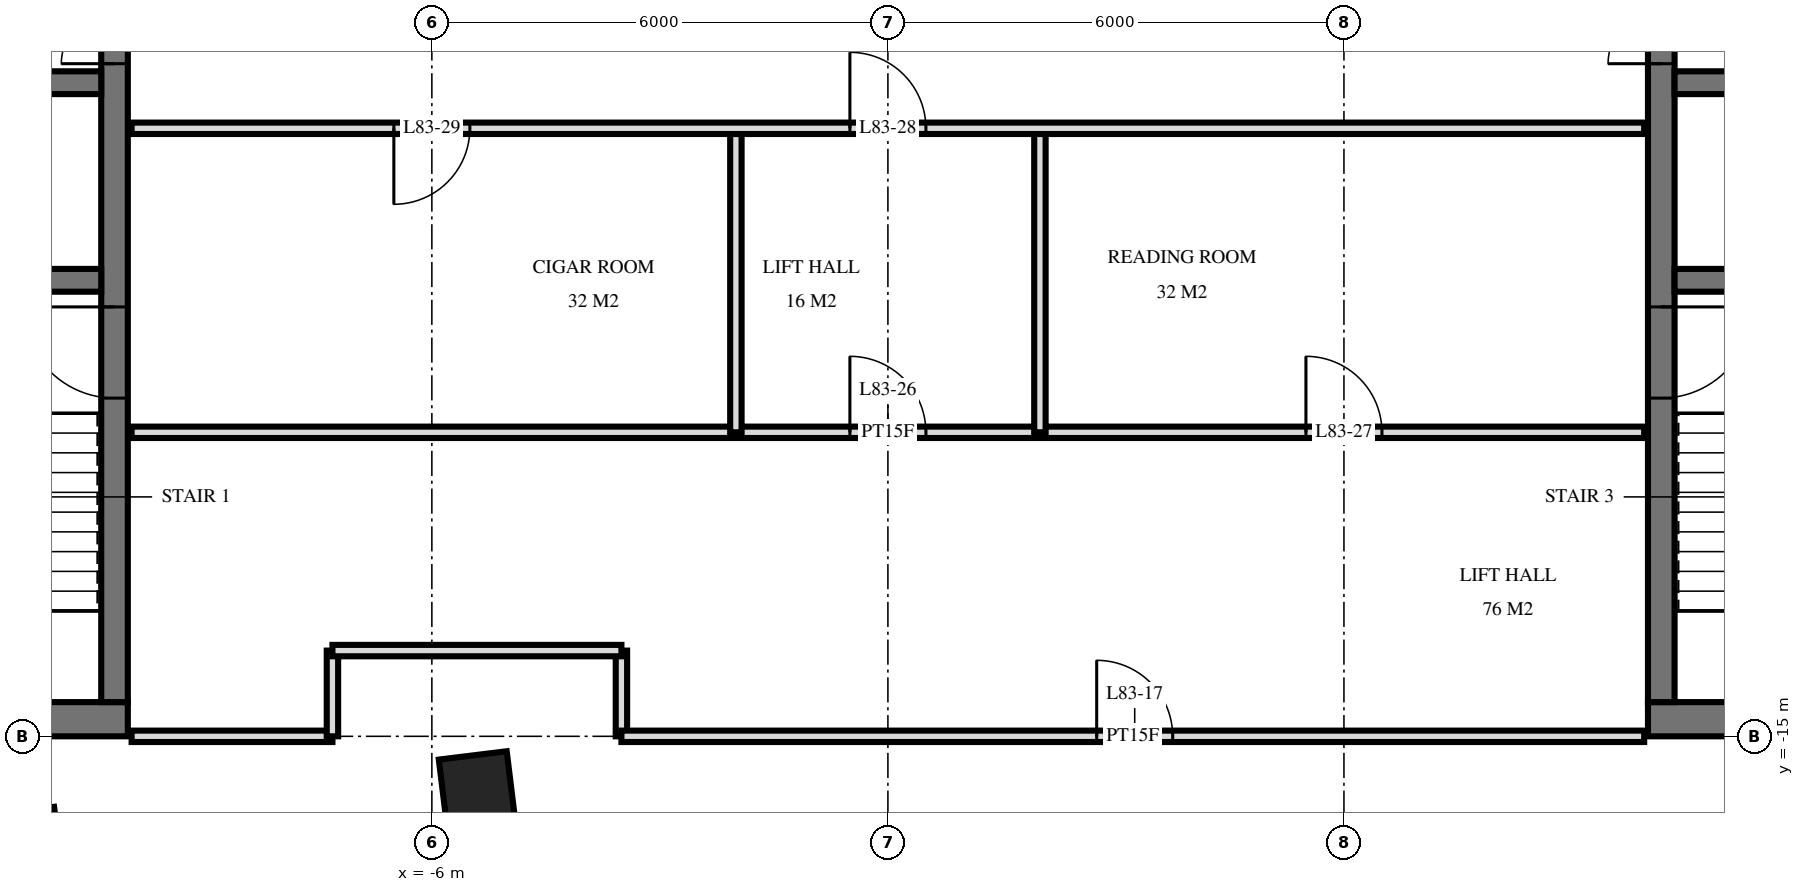
"""IFC4 building model, lengths in metres.
Left out: names, types, materials, properties, quantities, classifications, styles, units other than length and angle.
Written with IfcOpenShell. Run it as: python <this file> out.ifc"""

import sys

from ifc_helpers import new_model, si_unit, direction, frame, frame_2d, origin, origin_2d, place, context, subcontext, project, spatial, rectangle, extrude, element, fill, save


model = new_model("IFC4")
c1 = context("Model", 3, precision=1e-05, world=origin(), true_north=direction((0.0, 1.0)))
c2 = subcontext(c1, "Body", "Model", "MODEL_VIEW")
j1 = project(units=[si_unit("LENGTHUNIT", "METRE"), si_unit("PLANEANGLEUNIT", "RADIAN")], contexts=[c1])
p1 = place(None, origin())
s1 = spatial("IfcSite", under=j1, at=p1, CompositionType="ELEMENT")
p2 = place(p1, origin())
s2 = spatial("IfcBuilding", under=s1, at=p2, CompositionType="ELEMENT")
p3 = place(p2, frame((0.0, 0.0, 314.6)))
s3 = spatial("IfcBuildingStorey", under=s2, at=p3, CompositionType="ELEMENT", Elevation=314.6)
for number, where, z_axis, x_axis in (
    (1, (-11.362, -16.429, -0.28), (0.0, 0.0, 1.0), (0.993, 0.122, 0.0)),
    (2, (-5.407, -15.698, -0.28), (0.0, 0.0, 1.0), (0.993, 0.122, 0.0)),
):
    element("IfcColumn", number, at=place(p3, frame(where, z_axis=z_axis, x_axis=x_axis)), inside=s3, PredefinedType="COLUMN", context=c2, shape_type="SweptSolid", body=[
        extrude(rectangle(XDim=0.9, YDim=0.9, at=origin_2d()), origin(), (0.0, 0.0, 1.0), 4.28),
    ])
p4 = place(p3, frame((-19.5, -14.775, 0.0), z_axis=(0.0, 0.0, 1.0), x_axis=(1.0, 0.0, 0.0)))
e3 = element("IfcWall", 3, at=p4, inside=s3, PredefinedType="SHEAR", context=c2, shape_type="SweptSolid", body=[
    extrude(rectangle(XDim=9.5, YDim=0.45, at=frame_2d((4.75, 0.0))), origin(), (0.0, 0.0, 1.0), 4.0),
])
p5 = place(p4, frame((1.2, 0.0, 0.0)))
e4 = element("IfcOpeningElement", 4, at=p5, cuts=e3, PredefinedType="OPENING", context=c2, shape_type="SweptSolid", body=[
    extrude(rectangle(XDim=1.2, YDim=2.1, at=frame_2d((0.6, 1.05))), frame((0.0, 0.235, 0.0), z_axis=(0.0, -1.0, 0.0), x_axis=(1.0, 0.0, 0.0)), (0.0, 0.0, 1.0), 0.47),
])
p6 = place(p4, frame((4.25, 0.0, 0.0)))
e5 = element("IfcOpeningElement", 5, at=p6, cuts=e3, PredefinedType="OPENING", context=c2, shape_type="SweptSolid", body=[
    extrude(rectangle(XDim=1.1, YDim=2.1, at=frame_2d((0.55, 1.05))), frame((0.0, 0.235, 0.0), z_axis=(0.0, -1.0, 0.0), x_axis=(1.0, 0.0, 0.0)), (0.0, 0.0, 1.0), 0.47),
])
p7 = place(p3, frame((-10.175, -14.55, 0.0), z_axis=(0.0, 0.0, 1.0), x_axis=(0.0, 1.0, 0.0)))
e6 = element("IfcWall", 6, at=p7, inside=s3, PredefinedType="SHEAR", context=c2, shape_type="SweptSolid", body=[
    extrude(rectangle(XDim=14.1, YDim=0.35, at=frame_2d((7.05, 0.0))), origin(), (0.0, 0.0, 1.0), 4.0),
])
p8 = place(p7, frame((8.4, 0.0, 0.0)))
e7 = element("IfcOpeningElement", 7, at=p8, cuts=e6, PredefinedType="OPENING", context=c2, shape_type="SweptSolid", body=[
    extrude(rectangle(XDim=1.4, YDim=2.4, at=frame_2d((0.7, 1.2))), frame((0.0, 0.185, 0.0), z_axis=(0.0, -1.0, 0.0), x_axis=(1.0, 0.0, 0.0)), (0.0, 0.0, 1.0), 0.37),
])
p9 = place(p7, frame((10.0, 0.0, 0.0)))
e8 = element("IfcOpeningElement", 8, at=p9, cuts=e6, PredefinedType="OPENING", context=c2, shape_type="SweptSolid", body=[
    extrude(rectangle(XDim=1.4, YDim=2.4, at=frame_2d((0.7, 1.2))), frame((0.0, 0.185, 0.0), z_axis=(0.0, -1.0, 0.0), x_axis=(1.0, 0.0, 0.0)), (0.0, 0.0, 1.0), 0.37),
])
p10 = place(p7, frame((4.0, 0.0, 0.0)))
e9 = element("IfcOpeningElement", 9, at=p10, cuts=e6, PredefinedType="OPENING", context=c2, shape_type="SweptSolid", body=[
    extrude(rectangle(XDim=1.2, YDim=2.1, at=frame_2d((0.6, 1.05))), frame((0.0, 0.185, 0.0), z_axis=(0.0, -1.0, 0.0), x_axis=(1.0, 0.0, 0.0)), (0.0, 0.0, 1.0), 0.37),
])
p11 = place(p3, frame((-19.05, -6.4, 0.0), z_axis=(0.0, 0.0, 1.0), x_axis=(1.0, 0.0, 0.0)))
e10 = element("IfcWall", 10, at=p11, inside=s3, PredefinedType="SHEAR", context=c2, shape_type="SweptSolid", body=[
    extrude(rectangle(XDim=8.7, YDim=0.3, at=frame_2d((4.35, 0.0))), origin(), (0.0, 0.0, 1.0), 4.0),
])
p12 = place(p11, frame((0.8, 0.0, 0.0)))
e11 = element("IfcOpeningElement", 11, at=p12, cuts=e10, PredefinedType="OPENING", context=c2, shape_type="SweptSolid", body=[
    extrude(rectangle(XDim=1.1, YDim=2.1, at=frame_2d((0.55, 1.05))), frame((0.0, 0.16, 0.0), z_axis=(0.0, -1.0, 0.0), x_axis=(1.0, 0.0, 0.0)), (0.0, 0.0, 1.0), 0.32),
])
p13 = place(p3, frame((-19.05, -9.0, 0.0), z_axis=(0.0, 0.0, 1.0), x_axis=(1.0, 0.0, 0.0)))
e12 = element("IfcWall", 12, at=p13, inside=s3, PredefinedType="SHEAR", context=c2, shape_type="SweptSolid", body=[
    extrude(rectangle(XDim=8.7, YDim=0.3, at=frame_2d((4.35, 0.0))), origin(), (0.0, 0.0, 1.0), 4.0),
])
p14 = place(p13, frame((3.8, 0.0, 0.0)))
e13 = element("IfcOpeningElement", 13, at=p14, cuts=e12, PredefinedType="OPENING", context=c2, shape_type="SweptSolid", body=[
    extrude(rectangle(XDim=1.1, YDim=2.1, at=frame_2d((0.55, 1.05))), frame((0.0, 0.16, 0.0), z_axis=(0.0, -1.0, 0.0), x_axis=(1.0, 0.0, 0.0)), (0.0, 0.0, 1.0), 0.32),
])
p15 = place(p3, frame((10.0, -14.775, 0.0), z_axis=(0.0, 0.0, 1.0), x_axis=(1.0, 0.0, 0.0)))
e14 = element("IfcWall", 14, at=p15, inside=s3, PredefinedType="SHEAR", context=c2, shape_type="SweptSolid", body=[
    extrude(rectangle(XDim=9.5, YDim=0.45, at=frame_2d((4.75, 0.0))), origin(), (0.0, 0.0, 1.0), 4.0),
])
p16 = place(p15, frame((7.1, 0.0, 0.0)))
e15 = element("IfcOpeningElement", 15, at=p16, cuts=e14, PredefinedType="OPENING", context=c2, shape_type="SweptSolid", body=[
    extrude(rectangle(XDim=1.2, YDim=2.1, at=frame_2d((0.6, 1.05))), frame((0.0, 0.235, 0.0), z_axis=(0.0, -1.0, 0.0), x_axis=(1.0, 0.0, 0.0)), (0.0, 0.0, 1.0), 0.47),
])
p17 = place(p15, frame((4.15, 0.0, 0.0)))
e16 = element("IfcOpeningElement", 16, at=p17, cuts=e14, PredefinedType="OPENING", context=c2, shape_type="SweptSolid", body=[
    extrude(rectangle(XDim=1.1, YDim=2.1, at=frame_2d((0.55, 1.05))), frame((0.0, 0.235, 0.0), z_axis=(0.0, -1.0, 0.0), x_axis=(1.0, 0.0, 0.0)), (0.0, 0.0, 1.0), 0.47),
])
p18 = place(p3, frame((10.175, -14.55, 0.0), z_axis=(0.0, 0.0, 1.0), x_axis=(0.0, 1.0, 0.0)))
e17 = element("IfcWall", 17, at=p18, inside=s3, PredefinedType="SHEAR", context=c2, shape_type="SweptSolid", body=[
    extrude(rectangle(XDim=14.1, YDim=0.35, at=frame_2d((7.05, 0.0))), origin(), (0.0, 0.0, 1.0), 4.0),
])
p19 = place(p18, frame((8.4, 0.0, 0.0)))
e18 = element("IfcOpeningElement", 18, at=p19, cuts=e17, PredefinedType="OPENING", context=c2, shape_type="SweptSolid", body=[
    extrude(rectangle(XDim=1.4, YDim=2.4, at=frame_2d((0.7, 1.2))), frame((0.0, 0.185, 0.0), z_axis=(0.0, -1.0, 0.0), x_axis=(1.0, 0.0, 0.0)), (0.0, 0.0, 1.0), 0.37),
])
p20 = place(p18, frame((10.0, 0.0, 0.0)))
e19 = element("IfcOpeningElement", 19, at=p20, cuts=e17, PredefinedType="OPENING", context=c2, shape_type="SweptSolid", body=[
    extrude(rectangle(XDim=1.4, YDim=2.4, at=frame_2d((0.7, 1.2))), frame((0.0, 0.185, 0.0), z_axis=(0.0, -1.0, 0.0), x_axis=(1.0, 0.0, 0.0)), (0.0, 0.0, 1.0), 0.37),
])
p21 = place(p18, frame((4.0, 0.0, 0.0)))
e20 = element("IfcOpeningElement", 20, at=p21, cuts=e17, PredefinedType="OPENING", context=c2, shape_type="SweptSolid", body=[
    extrude(rectangle(XDim=1.2, YDim=2.1, at=frame_2d((0.6, 1.05))), frame((0.0, 0.185, 0.0), z_axis=(0.0, -1.0, 0.0), x_axis=(1.0, 0.0, 0.0)), (0.0, 0.0, 1.0), 0.37),
])
p22 = place(p3, frame((10.35, -6.4, 0.0), z_axis=(0.0, 0.0, 1.0), x_axis=(1.0, 0.0, 0.0)))
e21 = element("IfcWall", 21, at=p22, inside=s3, PredefinedType="SHEAR", context=c2, shape_type="SweptSolid", body=[
    extrude(rectangle(XDim=8.7, YDim=0.3, at=frame_2d((4.35, 0.0))), origin(), (0.0, 0.0, 1.0), 4.0),
])
p23 = place(p22, frame((6.8, 0.0, 0.0)))
e22 = element("IfcOpeningElement", 22, at=p23, cuts=e21, PredefinedType="OPENING", context=c2, shape_type="SweptSolid", body=[
    extrude(rectangle(XDim=1.1, YDim=2.1, at=frame_2d((0.55, 1.05))), frame((0.0, 0.16, 0.0), z_axis=(0.0, -1.0, 0.0), x_axis=(1.0, 0.0, 0.0)), (0.0, 0.0, 1.0), 0.32),
])
p24 = place(p3, frame((10.35, -9.0, 0.0), z_axis=(0.0, 0.0, 1.0), x_axis=(1.0, 0.0, 0.0)))
e23 = element("IfcWall", 23, at=p24, inside=s3, PredefinedType="SHEAR", context=c2, shape_type="SweptSolid", body=[
    extrude(rectangle(XDim=8.7, YDim=0.3, at=frame_2d((4.35, 0.0))), origin(), (0.0, 0.0, 1.0), 4.0),
])
p25 = place(p24, frame((3.8, 0.0, 0.0)))
e24 = element("IfcOpeningElement", 24, at=p25, cuts=e23, PredefinedType="OPENING", context=c2, shape_type="SweptSolid", body=[
    extrude(rectangle(XDim=1.1, YDim=2.1, at=frame_2d((0.55, 1.05))), frame((0.0, 0.16, 0.0), z_axis=(0.0, -1.0, 0.0), x_axis=(1.0, 0.0, 0.0)), (0.0, 0.0, 1.0), 0.32),
])
for number, where, z_axis, x_axis in (
    (25, (2.0, -11.0, 0.0), (0.0, 0.0, 1.0), (0.0, 1.0, 0.0)),
    (26, (-2.0, -11.0, 0.0), (0.0, 0.0, 1.0), (0.0, 1.0, 0.0)),
):
    element("IfcWall", number, at=place(p3, frame(where, z_axis=z_axis, x_axis=x_axis)), inside=s3, PredefinedType="PARTITIONING", context=c2, shape_type="SweptSolid", body=[
        extrude(rectangle(XDim=4.0, YDim=0.15, at=frame_2d((2.0, 0.0))), origin(), (0.0, 0.0, 1.0), 3.72),
    ])
for number, where, z_axis, x_axis in (
    (27, (-3.506, -15.0, 0.0), (0.0, 0.0, 1.0), (0.0, 1.0, 0.0)),
    (28, (-7.308, -15.0, 0.0), (0.0, 0.0, 1.0), (0.0, 1.0, 0.0)),
):
    element("IfcWall", number, at=place(p3, frame(where, z_axis=z_axis, x_axis=x_axis)), inside=s3, PredefinedType="PARTITIONING", context=c2, shape_type="SweptSolid", body=[
        extrude(rectangle(XDim=1.128, YDim=0.15, at=frame_2d((0.564, 0.0))), origin(), (0.0, 0.0, 1.0), 3.72),
    ])
p26 = place(p3, frame((-9.95, -15.0, 0.0), z_axis=(0.0, 0.0, 1.0), x_axis=(1.0, 0.0, 0.0)))
e29 = element("IfcWall", 29, at=p26, inside=s3, PredefinedType="PARTITIONING", context=c2, shape_type="SweptSolid", body=[
    extrude(rectangle(XDim=2.642, YDim=0.15, at=frame_2d((1.321, 0.0))), origin(), (0.0, 0.0, 1.0), 3.084),
])
p27 = place(p3, frame((-3.506, -15.0, 0.0), z_axis=(0.0, 0.0, 1.0), x_axis=(1.0, 0.0, 0.0)))
e30 = element("IfcWall", 30, at=p27, inside=s3, PredefinedType="PARTITIONING", context=c2, shape_type="SweptSolid", body=[
    extrude(rectangle(XDim=13.456, YDim=0.15, at=frame_2d((6.728, 0.0))), origin(), (0.0, 0.0, 1.0), 3.084),
])
p28 = place(p27, frame((6.253, 0.0, 0.0)))
e31 = element("IfcOpeningElement", 31, at=p28, cuts=e30, PredefinedType="OPENING", context=c2, shape_type="SweptSolid", body=[
    extrude(rectangle(XDim=1.0, YDim=2.1, at=frame_2d((0.5, 1.05))), frame((0.0, 0.085, 0.0), z_axis=(0.0, -1.0, 0.0), x_axis=(1.0, 0.0, 0.0)), (0.0, 0.0, 1.0), 0.17),
])
p29 = place(p3, frame((-7.308, -13.872, 0.0), z_axis=(0.0, 0.0, 1.0), x_axis=(1.0, 0.0, 0.0)))
e32 = element("IfcWall", 32, at=p29, inside=s3, PredefinedType="PARTITIONING", context=c2, shape_type="SweptSolid", body=[
    extrude(rectangle(XDim=3.802, YDim=0.15, at=frame_2d((1.901, 0.0))), origin(), (0.0, 0.0, 1.0), 3.72),
])
p30 = place(p3, frame((-9.95, -11.0, 0.0), z_axis=(0.0, 0.0, 1.0), x_axis=(1.0, 0.0, 0.0)))
e33 = element("IfcWall", 33, at=p30, inside=s3, PredefinedType="PARTITIONING", context=c2, shape_type="SweptSolid", body=[
    extrude(rectangle(XDim=19.9, YDim=0.15, at=frame_2d((9.95, 0.0))), origin(), (0.0, 0.0, 1.0), 3.72),
])
p31 = place(p30, frame((9.45, 0.0, 0.0)))
e34 = element("IfcOpeningElement", 34, at=p31, cuts=e33, PredefinedType="OPENING", context=c2, shape_type="SweptSolid", body=[
    extrude(rectangle(XDim=1.0, YDim=2.1, at=frame_2d((0.5, 1.05))), frame((0.0, 0.085, 0.0), z_axis=(0.0, -1.0, 0.0), x_axis=(1.0, 0.0, 0.0)), (0.0, 0.0, 1.0), 0.17),
])
p32 = place(p30, frame((15.45, 0.0, 0.0)))
e35 = element("IfcOpeningElement", 35, at=p32, cuts=e33, PredefinedType="OPENING", context=c2, shape_type="SweptSolid", body=[
    extrude(rectangle(XDim=1.0, YDim=2.1, at=frame_2d((0.5, 1.05))), frame((0.0, 0.085, 0.0), z_axis=(0.0, -1.0, 0.0), x_axis=(1.0, 0.0, 0.0)), (0.0, 0.0, 1.0), 0.17),
])
p33 = place(p3, frame((-9.95, -7.0, 0.0), z_axis=(0.0, 0.0, 1.0), x_axis=(1.0, 0.0, 0.0)))
e36 = element("IfcWall", 36, at=p33, inside=s3, PredefinedType="PARTITIONING", context=c2, shape_type="SweptSolid", body=[
    extrude(rectangle(XDim=19.9, YDim=0.15, at=frame_2d((9.95, 0.0))), origin(), (0.0, 0.0, 1.0), 3.72),
])
p34 = place(p33, frame((9.45, 0.0, 0.0)))
e37 = element("IfcOpeningElement", 37, at=p34, cuts=e36, PredefinedType="OPENING", context=c2, shape_type="SweptSolid", body=[
    extrude(rectangle(XDim=1.0, YDim=2.1, at=frame_2d((0.5, 1.05))), frame((0.0, 0.085, 0.0), z_axis=(0.0, -1.0, 0.0), x_axis=(1.0, 0.0, 0.0)), (0.0, 0.0, 1.0), 0.17),
])
p35 = place(p33, frame((3.45, 0.0, 0.0)))
e38 = element("IfcOpeningElement", 38, at=p35, cuts=e36, PredefinedType="OPENING", context=c2, shape_type="SweptSolid", body=[
    extrude(rectangle(XDim=1.0, YDim=2.1, at=frame_2d((0.5, 1.05))), frame((0.0, 0.085, 0.0), z_axis=(0.0, -1.0, 0.0), x_axis=(1.0, 0.0, 0.0)), (0.0, 0.0, 1.0), 0.17),
])
p36 = place(p8, origin())
e39 = element("IfcDoor", 39, at=p36, inside=s3, OperationType="DOUBLE_DOOR_SINGLE_SWING", PredefinedType="DOOR", context=c2, shape_type="SweptSolid", body=[
    extrude(rectangle(XDim=1.4, YDim=2.4, at=frame_2d((0.7, 1.2))), frame((0.0, 0.025, 0.0), z_axis=(0.0, -1.0, 0.0), x_axis=(1.0, 0.0, 0.0)), (0.0, 0.0, 1.0), 0.05),
])
fill(e7, e39)
p37 = place(p10, origin())
e40 = element("IfcDoor", 40, at=p37, inside=s3, OperationType="SINGLE_SWING_LEFT", PredefinedType="DOOR", context=c2, shape_type="SweptSolid", body=[
    extrude(rectangle(XDim=1.2, YDim=2.1, at=frame_2d((0.6, 1.05))), frame((0.0, 0.025, 0.0), z_axis=(0.0, -1.0, 0.0), x_axis=(1.0, 0.0, 0.0)), (0.0, 0.0, 1.0), 0.05),
])
fill(e9, e40)
p38 = place(p19, origin())
e41 = element("IfcDoor", 41, at=p38, inside=s3, OperationType="DOUBLE_DOOR_SINGLE_SWING", PredefinedType="DOOR", context=c2, shape_type="SweptSolid", body=[
    extrude(rectangle(XDim=1.4, YDim=2.4, at=frame_2d((0.7, 1.2))), frame((0.0, 0.025, 0.0), z_axis=(0.0, -1.0, 0.0), x_axis=(1.0, 0.0, 0.0)), (0.0, 0.0, 1.0), 0.05),
])
fill(e18, e41)
p39 = place(p21, frame((0.6, 0.0, 0.0), z_axis=(0.0, 0.0, 1.0), x_axis=(-1.0, 0.0, 0.0)))
e42 = element("IfcDoor", 42, at=p39, inside=s3, OperationType="SINGLE_SWING_RIGHT", PredefinedType="DOOR", context=c2, shape_type="SweptSolid", body=[
    extrude(rectangle(XDim=1.2, YDim=2.1, at=frame_2d((0.0, 1.05))), frame((0.0, -0.025, 0.0), z_axis=(0.0, 1.0, 0.0), x_axis=(-1.0, 0.0, 0.0)), (0.0, 0.0, 1.0), 0.05),
])
fill(e20, e42)
p40 = place(p28, origin())
e43 = element("IfcDoor", 43, at=p40, inside=s3, OperationType="SINGLE_SWING_RIGHT", PredefinedType="DOOR", context=c2, shape_type="SweptSolid", body=[
    extrude(rectangle(XDim=1.0, YDim=2.1, at=frame_2d((0.5, 1.05))), frame((0.0, 0.025, 0.0), z_axis=(0.0, -1.0, 0.0), x_axis=(1.0, 0.0, 0.0)), (0.0, 0.0, 1.0), 0.05),
])
fill(e31, e43)
p41 = place(p31, origin())
e44 = element("IfcDoor", 44, at=p41, inside=s3, OperationType="SINGLE_SWING_RIGHT", PredefinedType="DOOR", context=c2, shape_type="SweptSolid", body=[
    extrude(rectangle(XDim=1.0, YDim=2.1, at=frame_2d((0.5, 1.05))), frame((0.0, 0.025, 0.0), z_axis=(0.0, -1.0, 0.0), x_axis=(1.0, 0.0, 0.0)), (0.0, 0.0, 1.0), 0.05),
])
fill(e34, e44)
p42 = place(p32, origin())
e45 = element("IfcDoor", 45, at=p42, inside=s3, OperationType="SINGLE_SWING_RIGHT", PredefinedType="DOOR", context=c2, shape_type="SweptSolid", body=[
    extrude(rectangle(XDim=1.0, YDim=2.1, at=frame_2d((0.5, 1.05))), frame((0.0, 0.025, 0.0), z_axis=(0.0, -1.0, 0.0), x_axis=(1.0, 0.0, 0.0)), (0.0, 0.0, 1.0), 0.05),
])
fill(e35, e45)
p43 = place(p34, origin())
e46 = element("IfcDoor", 46, at=p43, inside=s3, OperationType="SINGLE_SWING_RIGHT", PredefinedType="DOOR", context=c2, shape_type="SweptSolid", body=[
    extrude(rectangle(XDim=1.0, YDim=2.1, at=frame_2d((0.5, 1.05))), frame((0.0, 0.025, 0.0), z_axis=(0.0, -1.0, 0.0), x_axis=(1.0, 0.0, 0.0)), (0.0, 0.0, 1.0), 0.05),
])
fill(e37, e46)
p44 = place(p35, frame((0.5, 0.0, 0.0), z_axis=(0.0, 0.0, 1.0), x_axis=(-1.0, 0.0, 0.0)))
e47 = element("IfcDoor", 47, at=p44, inside=s3, OperationType="SINGLE_SWING_LEFT", PredefinedType="DOOR", context=c2, shape_type="SweptSolid", body=[
    extrude(rectangle(XDim=1.0, YDim=2.1, at=frame_2d((0.0, 1.05))), frame((0.0, -0.025, 0.0), z_axis=(0.0, 1.0, 0.0), x_axis=(-1.0, 0.0, 0.0)), (0.0, 0.0, 1.0), 0.05),
])
fill(e38, e47)
save(model, sys.argv[1])
